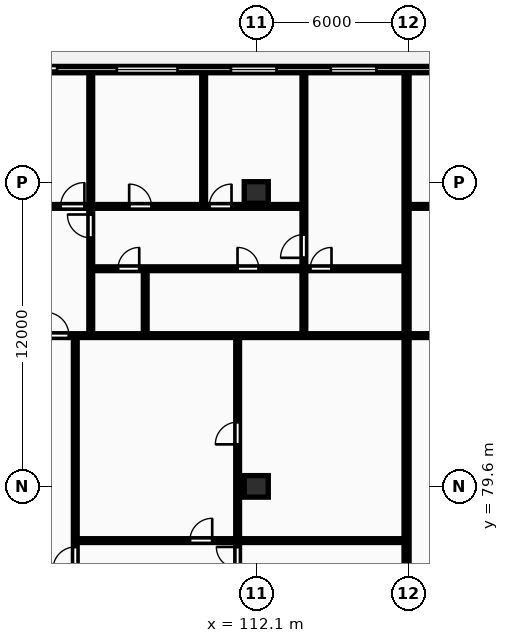
"""IFC4 building model, lengths in metres.
Left out: names, types, materials, properties, quantities, classifications, styles, units other than length and angle.
Written with IfcOpenShell. Run it as: python <this file> out.ifc"""

import sys

from ifc_helpers import new_model, si_unit, direction, frame, frame_2d, origin, origin_2d, place, context, subcontext, project, spatial, rectangle, extrude, element, fill, save


model = new_model("IFC4")
c1 = context("Model", 3, precision=1e-05, world=origin(), true_north=direction((0.0, 1.0)))
c2 = subcontext(c1, "Body", "Model", "MODEL_VIEW")
j1 = project(units=[si_unit("LENGTHUNIT", "METRE"), si_unit("PLANEANGLEUNIT", "RADIAN")], contexts=[c1])
p1 = place(None, origin())
s1 = spatial("IfcSite", under=j1, at=p1, CompositionType="ELEMENT")
p2 = place(p1, origin())
s2 = spatial("IfcBuilding", under=s1, at=p2, CompositionType="ELEMENT")
p3 = place(p2, frame((0.0, 0.0, 80.8)))
s3 = spatial("IfcBuildingStorey", under=s2, at=p3, CompositionType="ELEMENT", Elevation=80.8)
for number, where, z_axis, x_axis in (
    (1, (112.1, 79.6, 0.0), (0.0, 0.0, 1.0), (1.0, 0.0, 0.0)),
    (2, (112.1, 91.2, 0.0), (0.0, 0.0, 1.0), (1.0, 0.0, 0.0)),
):
    element("IfcColumn", number, at=place(p3, frame(where, z_axis=z_axis, x_axis=x_axis)), inside=s3, PredefinedType="COLUMN", context=c2, shape_type="SweptSolid", body=[
        extrude(rectangle(XDim=0.95, YDim=0.85, at=origin_2d()), origin(), (0.0, 0.0, 1.0), 3.25),
    ])
p4 = place(p3, frame((130.6, 96.05, 0.0), z_axis=(0.0, 0.0, 1.0), x_axis=(-1.0, 0.0, 0.0)))
e3 = element("IfcWall", 3, at=p4, inside=s3, PredefinedType="STANDARD", context=c2, shape_type="SweptSolid", body=[
    extrude(rectangle(XDim=73.0, YDim=0.25, at=frame_2d((36.5, 0.0))), origin(), (0.0, 0.0, 1.0), 2.97),
])
p5 = place(p4, frame((67.867, 0.0, 0.0)))
e4 = element("IfcOpeningElement", 4, at=p5, cuts=e3, PredefinedType="OPENING", context=c2, shape_type="SweptSolid", body=[
    extrude(rectangle(XDim=1.8, YDim=2.2, at=frame_2d((0.9, 1.1))), frame((0.0, 0.135, 0.0), z_axis=(0.0, -1.0, 0.0), x_axis=(1.0, 0.0, 0.0)), (0.0, 0.0, 1.0), 0.27),
])
p6 = place(p4, frame((62.103, 0.0, 0.85)))
e5 = element("IfcOpeningElement", 5, at=p6, cuts=e3, PredefinedType="OPENING", context=c2, shape_type="SweptSolid", body=[
    extrude(rectangle(XDim=1.8, YDim=1.8, at=frame_2d((0.9, 0.9))), frame((0.0, 0.135, 0.0), z_axis=(0.0, -1.0, 0.0), x_axis=(1.0, 0.0, 0.0)), (0.0, 0.0, 1.0), 0.27),
])
p7 = place(p4, frame((56.196, 0.0, 0.0)))
e6 = element("IfcOpeningElement", 6, at=p7, cuts=e3, PredefinedType="OPENING", context=c2, shape_type="SweptSolid", body=[
    extrude(rectangle(XDim=1.8, YDim=2.2, at=frame_2d((0.9, 1.1))), frame((0.0, 0.135, 0.0), z_axis=(0.0, -1.0, 0.0), x_axis=(1.0, 0.0, 0.0)), (0.0, 0.0, 1.0), 0.27),
])
p8 = place(p4, frame((46.557, 0.0, 0.85)))
e7 = element("IfcOpeningElement", 7, at=p8, cuts=e3, PredefinedType="OPENING", context=c2, shape_type="SweptSolid", body=[
    extrude(rectangle(XDim=2.4, YDim=1.9, at=frame_2d((1.2, 0.95))), frame((0.0, 0.135, 0.0), z_axis=(0.0, -1.0, 0.0), x_axis=(1.0, 0.0, 0.0)), (0.0, 0.0, 1.0), 0.27),
])
p9 = place(p4, frame((36.714, 0.0, 0.0)))
e8 = element("IfcOpeningElement", 8, at=p9, cuts=e3, PredefinedType="OPENING", context=c2, shape_type="SweptSolid", body=[
    extrude(rectangle(XDim=1.8, YDim=2.2, at=frame_2d((0.9, 1.1))), frame((0.0, 0.135, 0.0), z_axis=(0.0, -1.0, 0.0), x_axis=(1.0, 0.0, 0.0)), (0.0, 0.0, 1.0), 0.27),
])
p10 = place(p4, frame((30.483, 0.0, 0.85)))
e9 = element("IfcOpeningElement", 9, at=p10, cuts=e3, PredefinedType="OPENING", context=c2, shape_type="SweptSolid", body=[
    extrude(rectangle(XDim=1.8, YDim=1.8, at=frame_2d((0.9, 0.9))), frame((0.0, 0.135, 0.0), z_axis=(0.0, -1.0, 0.0), x_axis=(1.0, 0.0, 0.0)), (0.0, 0.0, 1.0), 0.27),
])
p11 = place(p4, frame((21.604, 0.0, 0.85)))
e10 = element("IfcOpeningElement", 10, at=p11, cuts=e3, PredefinedType="OPENING", context=c2, shape_type="SweptSolid", body=[
    extrude(rectangle(XDim=2.4, YDim=1.9, at=frame_2d((1.2, 0.95))), frame((0.0, 0.135, 0.0), z_axis=(0.0, -1.0, 0.0), x_axis=(1.0, 0.0, 0.0)), (0.0, 0.0, 1.0), 0.27),
])
p12 = place(p4, frame((17.698, 0.0, 0.85)))
e11 = element("IfcOpeningElement", 11, at=p12, cuts=e3, PredefinedType="OPENING", context=c2, shape_type="SweptSolid", body=[
    extrude(rectangle(XDim=1.8, YDim=1.8, at=frame_2d((0.9, 0.9))), frame((0.0, 0.135, 0.0), z_axis=(0.0, -1.0, 0.0), x_axis=(1.0, 0.0, 0.0)), (0.0, 0.0, 1.0), 0.27),
])
p13 = place(p4, frame((26.363, 0.0, 0.0)))
e12 = element("IfcOpeningElement", 12, at=p13, cuts=e3, PredefinedType="OPENING", context=c2, shape_type="SweptSolid", body=[
    extrude(rectangle(XDim=1.8, YDim=2.2, at=frame_2d((0.9, 1.1))), frame((0.0, 0.135, 0.0), z_axis=(0.0, -1.0, 0.0), x_axis=(1.0, 0.0, 0.0)), (0.0, 0.0, 1.0), 0.27),
])
p14 = place(p4, frame((13.753, 0.0, 0.85)))
e13 = element("IfcOpeningElement", 13, at=p14, cuts=e3, PredefinedType="OPENING", context=c2, shape_type="SweptSolid", body=[
    extrude(rectangle(XDim=1.8, YDim=1.8, at=frame_2d((0.9, 0.9))), frame((0.0, 0.135, 0.0), z_axis=(0.0, -1.0, 0.0), x_axis=(1.0, 0.0, 0.0)), (0.0, 0.0, 1.0), 0.27),
])
p15 = place(p4, frame((7.363, 0.0, 0.0)))
e14 = element("IfcOpeningElement", 14, at=p15, cuts=e3, PredefinedType="OPENING", context=c2, shape_type="SweptSolid", body=[
    extrude(rectangle(XDim=1.8, YDim=2.2, at=frame_2d((0.9, 1.1))), frame((0.0, 0.135, 0.0), z_axis=(0.0, -1.0, 0.0), x_axis=(1.0, 0.0, 0.0)), (0.0, 0.0, 1.0), 0.27),
])
p16 = place(p4, frame((0.9, 0.0, 0.85)))
e15 = element("IfcOpeningElement", 15, at=p16, cuts=e3, PredefinedType="OPENING", context=c2, shape_type="SweptSolid", body=[
    extrude(rectangle(XDim=2.4, YDim=1.9, at=frame_2d((1.2, 0.95))), frame((0.0, 0.135, 0.0), z_axis=(0.0, -1.0, 0.0), x_axis=(1.0, 0.0, 0.0)), (0.0, 0.0, 1.0), 0.27),
])
p17 = place(p3, frame((118.033, 69.43, 0.0), z_axis=(0.0, 0.0, 1.0), x_axis=(0.0, 1.0, 0.0)))
e16 = element("IfcWall", 16, at=p17, inside=s3, PredefinedType="PARTITIONING", context=c2, shape_type="SweptSolid", body=[
    extrude(rectangle(XDim=26.47, YDim=0.2, at=frame_2d((13.235, 0.0))), origin(), (0.0, 0.0, 1.0), 2.97),
])
p18 = place(p3, frame((111.365, 69.41, 0.0), z_axis=(0.0, 0.0, 1.0), x_axis=(0.0, 1.0, 0.0)))
e17 = element("IfcWall", 17, at=p18, inside=s3, PredefinedType="PARTITIONING", context=c2, shape_type="SweptSolid", body=[
    extrude(rectangle(XDim=16.1, YDim=0.15, at=frame_2d((8.05, 0.0))), origin(), (0.0, 0.0, 1.0), 2.97),
])
p19 = place(p18, frame((6.96, 0.0, 0.0)))
e18 = element("IfcOpeningElement", 18, at=p19, cuts=e17, PredefinedType="OPENING", context=c2, shape_type="SweptSolid", body=[
    extrude(rectangle(XDim=0.84, YDim=2.04, at=frame_2d((0.42, 1.02))), frame((0.0, 0.085, 0.0), z_axis=(0.0, -1.0, 0.0), x_axis=(1.0, 0.0, 0.0)), (0.0, 0.0, 1.0), 0.17),
])
p20 = place(p18, frame((11.848, 0.0, 0.0)))
e19 = element("IfcOpeningElement", 19, at=p20, cuts=e17, PredefinedType="OPENING", context=c2, shape_type="SweptSolid", body=[
    extrude(rectangle(XDim=0.88, YDim=2.06, at=frame_2d((0.44, 1.03))), frame((0.0, 0.085, 0.0), z_axis=(0.0, -1.0, 0.0), x_axis=(1.0, 0.0, 0.0)), (0.0, 0.0, 1.0), 0.17),
])
p21 = place(p3, frame((105.017, 77.46, 0.0), z_axis=(0.0, 0.0, 1.0), x_axis=(1.0, 0.0, 0.0)))
e20 = element("IfcWall", 20, at=p21, inside=s3, PredefinedType="PARTITIONING", context=c2, shape_type="SweptSolid", body=[
    extrude(rectangle(XDim=12.936, YDim=0.15, at=frame_2d((6.468, 0.0))), origin(), (0.0, 0.0, 1.0), 2.97),
])
p22 = place(p21, frame((4.464, 0.0, 0.0)))
e21 = element("IfcOpeningElement", 21, at=p22, cuts=e20, PredefinedType="OPENING", context=c2, shape_type="SweptSolid", body=[
    extrude(rectangle(XDim=0.88, YDim=2.06, at=frame_2d((0.44, 1.03))), frame((0.0, 0.085, 0.0), z_axis=(0.0, -1.0, 0.0), x_axis=(1.0, 0.0, 0.0)), (0.0, 0.0, 1.0), 0.17),
])
p23 = place(p3, frame((104.957, 69.41, 0.0), z_axis=(0.0, 0.0, 1.0), x_axis=(0.0, 1.0, 0.0)))
e22 = element("IfcWall", 22, at=p23, inside=s3, PredefinedType="PARTITIONING", context=c2, shape_type="SweptSolid", body=[
    extrude(rectangle(XDim=16.1, YDim=0.15, at=frame_2d((8.05, 0.0))), origin(), (0.0, 0.0, 1.0), 2.97),
])
p24 = place(p23, frame((6.92, 0.0, 0.0)))
e23 = element("IfcOpeningElement", 23, at=p24, cuts=e22, PredefinedType="OPENING", context=c2, shape_type="SweptSolid", body=[
    extrude(rectangle(XDim=0.88, YDim=2.06, at=frame_2d((0.44, 1.03))), frame((0.0, 0.085, 0.0), z_axis=(0.0, -1.0, 0.0), x_axis=(1.0, 0.0, 0.0)), (0.0, 0.0, 1.0), 0.17),
])
p25 = place(p3, frame((107.717, 85.59, 0.0), z_axis=(0.0, 0.0, 1.0), x_axis=(0.0, 1.0, 0.0)))
e24 = element("IfcWall", 24, at=p25, inside=s3, PredefinedType="PARTITIONING", context=c2, shape_type="SweptSolid", body=[
    extrude(rectangle(XDim=2.58, YDim=0.15, at=frame_2d((1.29, 0.0))), origin(), (0.0, 0.0, 1.0), 2.97),
])
p26 = place(p3, frame((110.024, 90.73, 0.0), z_axis=(0.0, 0.0, 1.0), x_axis=(0.0, 1.0, 0.0)))
e25 = element("IfcWall", 25, at=p26, inside=s3, PredefinedType="PARTITIONING", context=c2, shape_type="SweptSolid", body=[
    extrude(rectangle(XDim=5.17, YDim=0.15, at=frame_2d((2.585, 0.0))), origin(), (0.0, 0.0, 1.0), 2.97),
])
p27 = place(p3, frame((105.567, 85.59, 0.0), z_axis=(0.0, 0.0, 1.0), x_axis=(0.0, 1.0, 0.0)))
e26 = element("IfcWall", 26, at=p27, inside=s3, PredefinedType="PARTITIONING", context=c2, shape_type="SweptSolid", body=[
    extrude(rectangle(XDim=10.31, YDim=0.15, at=frame_2d((5.155, 0.0))), origin(), (0.0, 0.0, 1.0), 2.97),
])
p28 = place(p27, frame((3.82, 0.0, 0.0)))
e27 = element("IfcOpeningElement", 27, at=p28, cuts=e26, PredefinedType="OPENING", context=c2, shape_type="SweptSolid", body=[
    extrude(rectangle(XDim=0.92, YDim=2.08, at=frame_2d((0.46, 1.04))), frame((0.0, 0.085, 0.0), z_axis=(0.0, -1.0, 0.0), x_axis=(1.0, 0.0, 0.0)), (0.0, 0.0, 1.0), 0.17),
])
p29 = place(p3, frame((113.98, 85.59, 0.0), z_axis=(0.0, 0.0, 1.0), x_axis=(0.0, 1.0, 0.0)))
e28 = element("IfcWall", 28, at=p29, inside=s3, PredefinedType="PARTITIONING", context=c2, shape_type="SweptSolid", body=[
    extrude(rectangle(XDim=2.58, YDim=0.15, at=frame_2d((1.29, 0.0))), origin(), (0.0, 0.0, 1.0), 2.97),
])
p30 = place(p3, frame((113.98, 88.21, 0.0), z_axis=(0.0, 0.0, 1.0), x_axis=(0.0, 1.0, 0.0)))
e29 = element("IfcWall", 29, at=p30, inside=s3, PredefinedType="PARTITIONING", context=c2, shape_type="SweptSolid", body=[
    extrude(rectangle(XDim=7.69, YDim=0.15, at=frame_2d((3.845, 0.0))), origin(), (0.0, 0.0, 1.0), 2.97),
])
p31 = place(p30, frame((0.41, 0.0, 0.0)))
e30 = element("IfcOpeningElement", 30, at=p31, cuts=e29, PredefinedType="OPENING", context=c2, shape_type="SweptSolid", body=[
    extrude(rectangle(XDim=0.92, YDim=2.08, at=frame_2d((0.46, 1.04))), frame((0.0, 0.085, 0.0), z_axis=(0.0, -1.0, 0.0), x_axis=(1.0, 0.0, 0.0)), (0.0, 0.0, 1.0), 0.17),
])
p32 = place(p3, frame((105.607, 88.19, 0.0), z_axis=(0.0, 0.0, 1.0), x_axis=(1.0, 0.0, 0.0)))
e31 = element("IfcWall", 31, at=p32, inside=s3, PredefinedType="PARTITIONING", context=c2, shape_type="SweptSolid", body=[
    extrude(rectangle(XDim=12.346, YDim=0.15, at=frame_2d((6.173, 0.0))), origin(), (0.0, 0.0, 1.0), 2.97),
])
p33 = place(p32, frame((1.034, 0.0, 0.0)))
e32 = element("IfcOpeningElement", 32, at=p33, cuts=e31, PredefinedType="OPENING", context=c2, shape_type="SweptSolid", body=[
    extrude(rectangle(XDim=0.84, YDim=2.04, at=frame_2d((0.42, 1.02))), frame((0.0, 0.085, 0.0), z_axis=(0.0, -1.0, 0.0), x_axis=(1.0, 0.0, 0.0)), (0.0, 0.0, 1.0), 0.17),
])
p34 = place(p32, frame((5.753, 0.0, 0.0)))
e33 = element("IfcOpeningElement", 33, at=p34, cuts=e31, PredefinedType="OPENING", context=c2, shape_type="SweptSolid", body=[
    extrude(rectangle(XDim=0.84, YDim=2.04, at=frame_2d((0.42, 1.02))), frame((0.0, 0.085, 0.0), z_axis=(0.0, -1.0, 0.0), x_axis=(1.0, 0.0, 0.0)), (0.0, 0.0, 1.0), 0.17),
])
p35 = place(p32, frame((8.623, 0.0, 0.0)))
e34 = element("IfcOpeningElement", 34, at=p35, cuts=e31, PredefinedType="OPENING", context=c2, shape_type="SweptSolid", body=[
    extrude(rectangle(XDim=0.84, YDim=2.04, at=frame_2d((0.42, 1.02))), frame((0.0, 0.085, 0.0), z_axis=(0.0, -1.0, 0.0), x_axis=(1.0, 0.0, 0.0)), (0.0, 0.0, 1.0), 0.17),
])
p36 = place(p3, frame((101.067, 85.55, 0.0), z_axis=(0.0, 0.0, 1.0), x_axis=(1.0, 0.0, 0.0)))
e35 = element("IfcWall", 35, at=p36, inside=s3, PredefinedType="PARTITIONING", context=c2, shape_type="SweptSolid", body=[
    extrude(rectangle(XDim=16.886, YDim=0.15, at=frame_2d((8.443, 0.0))), origin(), (0.0, 0.0, 1.0), 2.97),
])
p37 = place(p36, frame((2.72, 0.0, 0.0)))
e36 = element("IfcOpeningElement", 36, at=p37, cuts=e35, PredefinedType="OPENING", context=c2, shape_type="SweptSolid", body=[
    extrude(rectangle(XDim=0.92, YDim=2.08, at=frame_2d((0.46, 1.04))), frame((0.0, 0.085, 0.0), z_axis=(0.0, -1.0, 0.0), x_axis=(1.0, 0.0, 0.0)), (0.0, 0.0, 1.0), 0.17),
])
p38 = place(p3, frame((101.067, 90.65, 0.0), z_axis=(0.0, 0.0, 1.0), x_axis=(1.0, 0.0, 0.0)))
e37 = element("IfcWall", 37, at=p38, inside=s3, PredefinedType="PARTITIONING", context=c2, shape_type="SweptSolid", body=[
    extrude(rectangle(XDim=12.913, YDim=0.15, at=frame_2d((6.457, 0.0))), origin(), (0.0, 0.0, 1.0), 2.97),
])
p39 = place(p38, frame((3.31, 0.0, 0.0)))
e38 = element("IfcOpeningElement", 38, at=p39, cuts=e37, PredefinedType="OPENING", context=c2, shape_type="SweptSolid", body=[
    extrude(rectangle(XDim=0.94, YDim=2.1, at=frame_2d((0.47, 1.05))), frame((0.0, 0.085, 0.0), z_axis=(0.0, -1.0, 0.0), x_axis=(1.0, 0.0, 0.0)), (0.0, 0.0, 1.0), 0.17),
])
p40 = place(p38, frame((6.016, 0.0, 0.0)))
e39 = element("IfcOpeningElement", 39, at=p40, cuts=e37, PredefinedType="OPENING", context=c2, shape_type="SweptSolid", body=[
    extrude(rectangle(XDim=0.88, YDim=2.06, at=frame_2d((0.44, 1.03))), frame((0.0, 0.085, 0.0), z_axis=(0.0, -1.0, 0.0), x_axis=(1.0, 0.0, 0.0)), (0.0, 0.0, 1.0), 0.17),
])
p41 = place(p38, frame((9.177, 0.0, 0.0)))
e40 = element("IfcOpeningElement", 40, at=p41, cuts=e37, PredefinedType="OPENING", context=c2, shape_type="SweptSolid", body=[
    extrude(rectangle(XDim=0.88, YDim=2.06, at=frame_2d((0.44, 1.03))), frame((0.0, 0.085, 0.0), z_axis=(0.0, -1.0, 0.0), x_axis=(1.0, 0.0, 0.0)), (0.0, 0.0, 1.0), 0.17),
])
p42 = place(p3, frame((118.113, 85.55, 0.0), z_axis=(0.0, 0.0, 1.0), x_axis=(1.0, 0.0, 0.0)))
e41 = element("IfcWall", 41, at=p42, inside=s3, PredefinedType="PARTITIONING", context=c2, shape_type="SweptSolid", body=[
    extrude(rectangle(XDim=12.407, YDim=0.15, at=frame_2d((6.203, 0.0))), origin(), (0.0, 0.0, 1.0), 2.97),
])
p43 = place(p42, frame((2.72, 0.0, 0.0)))
e42 = element("IfcOpeningElement", 42, at=p43, cuts=e41, PredefinedType="OPENING", context=c2, shape_type="SweptSolid", body=[
    extrude(rectangle(XDim=0.92, YDim=2.08, at=frame_2d((0.46, 1.04))), frame((0.0, 0.085, 0.0), z_axis=(0.0, -1.0, 0.0), x_axis=(1.0, 0.0, 0.0)), (0.0, 0.0, 1.0), 0.17),
])
p44 = place(p3, frame((118.113, 90.65, 0.0), z_axis=(0.0, 0.0, 1.0), x_axis=(1.0, 0.0, 0.0)))
e43 = element("IfcWall", 43, at=p44, inside=s3, PredefinedType="PARTITIONING", context=c2, shape_type="SweptSolid", body=[
    extrude(rectangle(XDim=12.407, YDim=0.15, at=frame_2d((6.203, 0.0))), origin(), (0.0, 0.0, 1.0), 2.97),
])
p45 = place(p44, frame((5.733, 0.0, 0.0)))
e44 = element("IfcOpeningElement", 44, at=p45, cuts=e43, PredefinedType="OPENING", context=c2, shape_type="SweptSolid", body=[
    extrude(rectangle(XDim=0.94, YDim=2.1, at=frame_2d((0.47, 1.05))), frame((0.0, 0.085, 0.0), z_axis=(0.0, -1.0, 0.0), x_axis=(1.0, 0.0, 0.0)), (0.0, 0.0, 1.0), 0.17),
])
p46 = place(p11, origin())
e45 = element("IfcWindow", 45, at=p46, inside=s3, PartitioningType="DOUBLE_PANEL_VERTICAL", PredefinedType="WINDOW", context=c2, shape_type="SweptSolid", body=[
    extrude(rectangle(XDim=2.4, YDim=1.9, at=frame_2d((1.2, 0.95))), frame((0.0, 0.03, 0.0), z_axis=(0.0, -1.0, 0.0), x_axis=(1.0, 0.0, 0.0)), (0.0, 0.0, 1.0), 0.06),
])
fill(e10, e45)
p47 = place(p12, origin())
e46 = element("IfcWindow", 46, at=p47, inside=s3, PartitioningType="SINGLE_PANEL", PredefinedType="WINDOW", context=c2, shape_type="SweptSolid", body=[
    extrude(rectangle(XDim=1.8, YDim=1.8, at=frame_2d((0.9, 0.9))), frame((0.0, 0.03, 0.0), z_axis=(0.0, -1.0, 0.0), x_axis=(1.0, 0.0, 0.0)), (0.0, 0.0, 1.0), 0.06),
])
fill(e11, e46)
p48 = place(p13, origin())
e47 = element("IfcDoor", 47, at=p48, inside=s3, OperationType="SLIDING_TO_LEFT", PredefinedType="DOOR", context=c2, shape_type="SweptSolid", body=[
    extrude(rectangle(XDim=1.8, YDim=2.2, at=frame_2d((0.9, 1.1))), frame((0.0, 0.025, 0.0), z_axis=(0.0, -1.0, 0.0), x_axis=(1.0, 0.0, 0.0)), (0.0, 0.0, 1.0), 0.05),
])
fill(e12, e47)
p49 = place(p14, origin())
e48 = element("IfcWindow", 48, at=p49, inside=s3, PartitioningType="SINGLE_PANEL", PredefinedType="WINDOW", context=c2, shape_type="SweptSolid", body=[
    extrude(rectangle(XDim=1.8, YDim=1.8, at=frame_2d((0.9, 0.9))), frame((0.0, 0.03, 0.0), z_axis=(0.0, -1.0, 0.0), x_axis=(1.0, 0.0, 0.0)), (0.0, 0.0, 1.0), 0.06),
])
fill(e13, e48)
p50 = place(p19, origin())
e49 = element("IfcDoor", 49, at=p50, inside=s3, OperationType="SINGLE_SWING_RIGHT", PredefinedType="DOOR", context=c2, shape_type="SweptSolid", body=[
    extrude(rectangle(XDim=0.84, YDim=2.04, at=frame_2d((0.42, 1.02))), frame((0.0, 0.025, 0.0), z_axis=(0.0, -1.0, 0.0), x_axis=(1.0, 0.0, 0.0)), (0.0, 0.0, 1.0), 0.05),
])
fill(e18, e49)
p51 = place(p20, origin())
e50 = element("IfcDoor", 50, at=p51, inside=s3, OperationType="SINGLE_SWING_LEFT", PredefinedType="DOOR", context=c2, shape_type="SweptSolid", body=[
    extrude(rectangle(XDim=0.88, YDim=2.06, at=frame_2d((0.44, 1.03))), frame((0.0, 0.025, 0.0), z_axis=(0.0, -1.0, 0.0), x_axis=(1.0, 0.0, 0.0)), (0.0, 0.0, 1.0), 0.05),
])
fill(e19, e50)
p52 = place(p22, origin())
e51 = element("IfcDoor", 51, at=p52, inside=s3, OperationType="SINGLE_SWING_RIGHT", PredefinedType="DOOR", context=c2, shape_type="SweptSolid", body=[
    extrude(rectangle(XDim=0.88, YDim=2.06, at=frame_2d((0.44, 1.03))), frame((0.0, 0.025, 0.0), z_axis=(0.0, -1.0, 0.0), x_axis=(1.0, 0.0, 0.0)), (0.0, 0.0, 1.0), 0.05),
])
fill(e21, e51)
p53 = place(p24, origin())
e52 = element("IfcDoor", 52, at=p53, inside=s3, OperationType="SINGLE_SWING_LEFT", PredefinedType="DOOR", context=c2, shape_type="SweptSolid", body=[
    extrude(rectangle(XDim=0.88, YDim=2.06, at=frame_2d((0.44, 1.03))), frame((0.0, 0.025, 0.0), z_axis=(0.0, -1.0, 0.0), x_axis=(1.0, 0.0, 0.0)), (0.0, 0.0, 1.0), 0.05),
])
fill(e23, e52)
p54 = place(p28, origin())
e53 = element("IfcDoor", 53, at=p54, inside=s3, OperationType="SINGLE_SWING_RIGHT", PredefinedType="DOOR", context=c2, shape_type="SweptSolid", body=[
    extrude(rectangle(XDim=0.92, YDim=2.08, at=frame_2d((0.46, 1.04))), frame((0.0, 0.025, 0.0), z_axis=(0.0, -1.0, 0.0), x_axis=(1.0, 0.0, 0.0)), (0.0, 0.0, 1.0), 0.05),
])
fill(e27, e53)
p55 = place(p31, origin())
e54 = element("IfcDoor", 54, at=p55, inside=s3, OperationType="SINGLE_SWING_LEFT", PredefinedType="DOOR", context=c2, shape_type="SweptSolid", body=[
    extrude(rectangle(XDim=0.92, YDim=2.08, at=frame_2d((0.46, 1.04))), frame((0.0, 0.025, 0.0), z_axis=(0.0, -1.0, 0.0), x_axis=(1.0, 0.0, 0.0)), (0.0, 0.0, 1.0), 0.05),
])
fill(e30, e54)
p56 = place(p33, origin())
e55 = element("IfcDoor", 55, at=p56, inside=s3, OperationType="SINGLE_SWING_RIGHT", PredefinedType="DOOR", context=c2, shape_type="SweptSolid", body=[
    extrude(rectangle(XDim=0.84, YDim=2.04, at=frame_2d((0.42, 1.02))), frame((0.0, 0.025, 0.0), z_axis=(0.0, -1.0, 0.0), x_axis=(1.0, 0.0, 0.0)), (0.0, 0.0, 1.0), 0.05),
])
fill(e32, e55)
p57 = place(p34, origin())
e56 = element("IfcDoor", 56, at=p57, inside=s3, OperationType="SINGLE_SWING_LEFT", PredefinedType="DOOR", context=c2, shape_type="SweptSolid", body=[
    extrude(rectangle(XDim=0.84, YDim=2.04, at=frame_2d((0.42, 1.02))), frame((0.0, 0.025, 0.0), z_axis=(0.0, -1.0, 0.0), x_axis=(1.0, 0.0, 0.0)), (0.0, 0.0, 1.0), 0.05),
])
fill(e33, e56)
p58 = place(p35, origin())
e57 = element("IfcDoor", 57, at=p58, inside=s3, OperationType="SINGLE_SWING_RIGHT", PredefinedType="DOOR", context=c2, shape_type="SweptSolid", body=[
    extrude(rectangle(XDim=0.84, YDim=2.04, at=frame_2d((0.42, 1.02))), frame((0.0, 0.025, 0.0), z_axis=(0.0, -1.0, 0.0), x_axis=(1.0, 0.0, 0.0)), (0.0, 0.0, 1.0), 0.05),
])
fill(e34, e57)
p59 = place(p37, origin())
e58 = element("IfcDoor", 58, at=p59, inside=s3, OperationType="SINGLE_SWING_LEFT", PredefinedType="DOOR", context=c2, shape_type="SweptSolid", body=[
    extrude(rectangle(XDim=0.92, YDim=2.08, at=frame_2d((0.46, 1.04))), frame((0.0, 0.025, 0.0), z_axis=(0.0, -1.0, 0.0), x_axis=(1.0, 0.0, 0.0)), (0.0, 0.0, 1.0), 0.05),
])
fill(e36, e58)
p60 = place(p39, origin())
e59 = element("IfcDoor", 59, at=p60, inside=s3, OperationType="SINGLE_SWING_RIGHT", PredefinedType="DOOR", context=c2, shape_type="SweptSolid", body=[
    extrude(rectangle(XDim=0.94, YDim=2.1, at=frame_2d((0.47, 1.05))), frame((0.0, 0.025, 0.0), z_axis=(0.0, -1.0, 0.0), x_axis=(1.0, 0.0, 0.0)), (0.0, 0.0, 1.0), 0.05),
])
fill(e38, e59)
p61 = place(p40, origin())
e60 = element("IfcDoor", 60, at=p61, inside=s3, OperationType="SINGLE_SWING_LEFT", PredefinedType="DOOR", context=c2, shape_type="SweptSolid", body=[
    extrude(rectangle(XDim=0.88, YDim=2.06, at=frame_2d((0.44, 1.03))), frame((0.0, 0.025, 0.0), z_axis=(0.0, -1.0, 0.0), x_axis=(1.0, 0.0, 0.0)), (0.0, 0.0, 1.0), 0.05),
])
fill(e39, e60)
p62 = place(p41, origin())
e61 = element("IfcDoor", 61, at=p62, inside=s3, OperationType="SINGLE_SWING_RIGHT", PredefinedType="DOOR", context=c2, shape_type="SweptSolid", body=[
    extrude(rectangle(XDim=0.88, YDim=2.06, at=frame_2d((0.44, 1.03))), frame((0.0, 0.025, 0.0), z_axis=(0.0, -1.0, 0.0), x_axis=(1.0, 0.0, 0.0)), (0.0, 0.0, 1.0), 0.05),
])
fill(e40, e61)
save(model, sys.argv[1])
